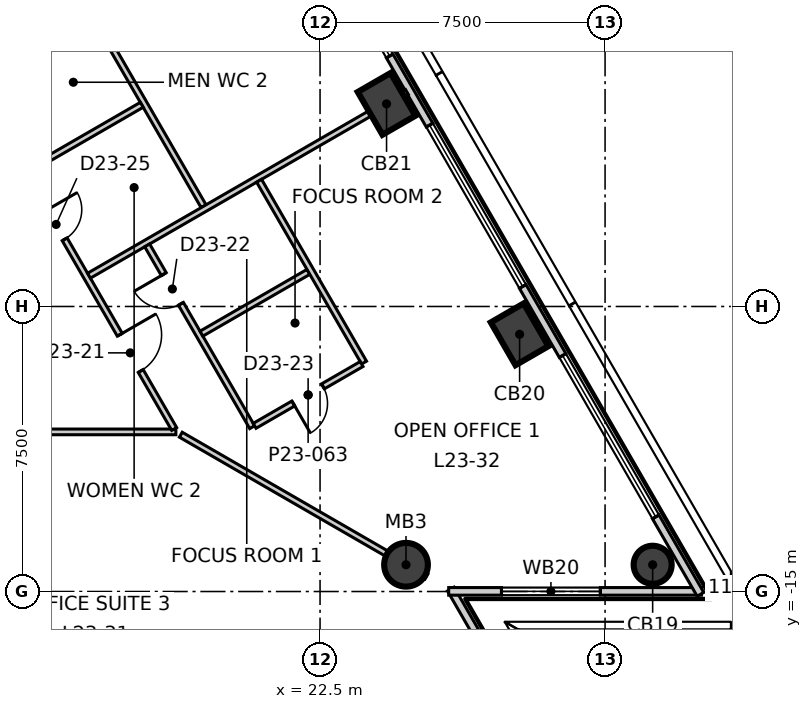
"""IFC4 building model, lengths in metres.
Left out: names, types, materials, properties, quantities, classifications, styles, units other than length and angle.
Written with IfcOpenShell. Run it as: python <this file> out.ifc"""

import sys

from ifc_helpers import new_model, si_unit, direction, frame, frame_2d, origin, origin_2d, place, context, subcontext, project, spatial, rectangle, circle, extrude, element, fill, save


model = new_model("IFC4")
c1 = context("Model", 3, precision=1e-05, world=origin(), true_north=direction((0.0, 1.0)))
c2 = subcontext(c1, "Body", "Model", "MODEL_VIEW")
j1 = project(units=[si_unit("LENGTHUNIT", "METRE"), si_unit("PLANEANGLEUNIT", "RADIAN")], contexts=[c1])
p1 = place(None, origin())
s1 = spatial("IfcSite", under=j1, at=p1, CompositionType="ELEMENT")
p2 = place(p1, origin())
s2 = spatial("IfcBuilding", under=s1, at=p2, CompositionType="ELEMENT")
p3 = place(p2, frame((0.0, 0.0, 104.3)))
s3 = spatial("IfcBuildingStorey", under=s2, at=p3, CompositionType="ELEMENT", Elevation=104.3)
p4 = place(p3, frame((31.252, -14.296, -0.3), z_axis=(0.0, 0.0, 1.0), x_axis=(-0.5, 0.866025403784, 0.0)))
e1 = element("IfcColumn", 1, at=p4, inside=s3, PredefinedType="COLUMN", context=c2, shape_type="SweptSolid", body=[
    extrude(circle(Radius=0.5, at=origin_2d()), origin(), (0.0, 0.0, 1.0), 4.0),
])
for number, where, z_axis, x_axis in (
    (2, (27.751, -8.232, -0.3), (0.0, 0.0, 1.0), (-0.5, 0.866, 0.0)),
    (3, (24.25, -2.169, -0.3), (0.0, 0.0, 1.0), (-0.5, 0.866, 0.0)),
):
    element("IfcColumn", number, at=place(p3, frame(where, z_axis=z_axis, x_axis=x_axis)), inside=s3, PredefinedType="COLUMN", context=c2, shape_type="SweptSolid", body=[
        extrude(rectangle(XDim=1.3, YDim=1.0, at=origin_2d()), origin(), (0.0, 0.0, 1.0), 4.0),
    ])
p5 = place(p3, frame((24.762, -14.296, -0.3), z_axis=(0.0, 0.0, 1.0), x_axis=(1.0, 0.0, 0.0)))
e4 = element("IfcColumn", 4, at=p5, inside=s3, PredefinedType="COLUMN", context=c2, shape_type="SweptSolid", body=[
    extrude(circle(Radius=0.575, at=origin_2d()), origin(), (0.0, 0.0, 1.0), 4.0),
])
p6 = place(p3, frame((29.265, -20.695, 0.0), z_axis=(0.0, 0.0, 1.0), x_axis=(-0.499933237632, 0.866063945624, 0.0)))
e5 = element("IfcWall", 5, at=p6, inside=s3, PredefinedType="ELEMENTEDWALL", context=c2, shape_type="SweptSolid", body=[
    extrude(rectangle(XDim=6.651, YDim=0.2, at=frame_2d((3.325, 0.0))), origin(), (0.0, 0.0, 1.0), 3.7),
])
p7 = place(p6, frame((1.99, 0.0, 0.9)))
e6 = element("IfcOpeningElement", 6, at=p7, cuts=e5, PredefinedType="OPENING", context=c2, shape_type="SweptSolid", body=[
    extrude(rectangle(XDim=2.6, YDim=2.5, at=frame_2d((1.3, 1.25))), frame((0.0, 0.11, 0.0), z_axis=(0.0, -1.0, 0.0), x_axis=(1.0, 0.0, 0.0)), (0.0, 0.0, 1.0), 0.22),
])
p8 = place(p3, frame((25.885, -14.996, 0.0), z_axis=(0.0, 0.0, 1.0), x_axis=(1.0, 0.0, 0.0)))
e7 = element("IfcWall", 7, at=p8, inside=s3, PredefinedType="ELEMENTEDWALL", context=c2, shape_type="SweptSolid", body=[
    extrude(rectangle(XDim=6.65, YDim=0.2, at=frame_2d((3.325, 0.0))), origin(), (0.0, 0.0, 1.0), 3.7),
])
p9 = place(p8, frame((1.39, 0.0, 0.9)))
e8 = element("IfcOpeningElement", 8, at=p9, cuts=e7, PredefinedType="OPENING", context=c2, shape_type="SweptSolid", body=[
    extrude(rectangle(XDim=2.6, YDim=2.5, at=frame_2d((1.3, 1.25))), frame((0.0, 0.11, 0.0), z_axis=(0.0, -1.0, 0.0), x_axis=(1.0, 0.0, 0.0)), (0.0, 0.0, 1.0), 0.22),
])
p10 = place(p3, frame((32.51, -15.074, 0.0), z_axis=(0.0, 0.0, 1.0), x_axis=(-0.500008323105, 0.866020598384, 0.0)))
e9 = element("IfcWall", 9, at=p10, inside=s3, PredefinedType="ELEMENTEDWALL", context=c2, shape_type="SweptSolid", body=[
    extrude(rectangle(XDim=58.599, YDim=0.2, at=frame_2d((29.3, 0.0))), origin(), (0.0, 0.0, 1.0), 3.7),
])
p11 = place(p10, frame((2.354, 0.0, 0.9)))
e10 = element("IfcOpeningElement", 10, at=p11, cuts=e9, PredefinedType="OPENING", context=c2, shape_type="SweptSolid", body=[
    extrude(rectangle(XDim=4.9, YDim=2.5, at=frame_2d((2.45, 1.25))), frame((0.0, 0.11, 0.0), z_axis=(0.0, -1.0, 0.0), x_axis=(1.0, 0.0, 0.0)), (0.0, 0.0, 1.0), 0.22),
])
p12 = place(p10, frame((9.355, 0.0, 0.9)))
e11 = element("IfcOpeningElement", 11, at=p12, cuts=e9, PredefinedType="OPENING", context=c2, shape_type="SweptSolid", body=[
    extrude(rectangle(XDim=4.9, YDim=2.5, at=frame_2d((2.45, 1.25))), frame((0.0, 0.11, 0.0), z_axis=(0.0, -1.0, 0.0), x_axis=(1.0, 0.0, 0.0)), (0.0, 0.0, 1.0), 0.22),
])
p13 = place(p10, frame((16.357, 0.0, 0.9)))
e12 = element("IfcOpeningElement", 12, at=p13, cuts=e9, PredefinedType="OPENING", context=c2, shape_type="SweptSolid", body=[
    extrude(rectangle(XDim=4.9, YDim=2.5, at=frame_2d((2.45, 1.25))), frame((0.0, 0.11, 0.0), z_axis=(0.0, -1.0, 0.0), x_axis=(1.0, 0.0, 0.0)), (0.0, 0.0, 1.0), 0.22),
])
p14 = place(p10, frame((23.359, 0.0, 0.9)))
e13 = element("IfcOpeningElement", 13, at=p14, cuts=e9, PredefinedType="OPENING", context=c2, shape_type="SweptSolid", body=[
    extrude(rectangle(XDim=4.9, YDim=2.5, at=frame_2d((2.45, 1.25))), frame((0.0, 0.11, 0.0), z_axis=(0.0, -1.0, 0.0), x_axis=(1.0, 0.0, 0.0)), (0.0, 0.0, 1.0), 0.22),
])
p15 = place(p10, frame((30.36, 0.0, 0.9)))
e14 = element("IfcOpeningElement", 14, at=p15, cuts=e9, PredefinedType="OPENING", context=c2, shape_type="SweptSolid", body=[
    extrude(rectangle(XDim=4.9, YDim=2.5, at=frame_2d((2.45, 1.25))), frame((0.0, 0.11, 0.0), z_axis=(0.0, -1.0, 0.0), x_axis=(1.0, 0.0, 0.0)), (0.0, 0.0, 1.0), 0.22),
])
p16 = place(p10, frame((37.362, 0.0, 0.9)))
e15 = element("IfcOpeningElement", 15, at=p16, cuts=e9, PredefinedType="OPENING", context=c2, shape_type="SweptSolid", body=[
    extrude(rectangle(XDim=4.9, YDim=2.5, at=frame_2d((2.45, 1.25))), frame((0.0, 0.11, 0.0), z_axis=(0.0, -1.0, 0.0), x_axis=(1.0, 0.0, 0.0)), (0.0, 0.0, 1.0), 0.22),
])
p17 = place(p10, frame((44.364, 0.0, 0.9)))
e16 = element("IfcOpeningElement", 16, at=p17, cuts=e9, PredefinedType="OPENING", context=c2, shape_type="SweptSolid", body=[
    extrude(rectangle(XDim=4.9, YDim=2.5, at=frame_2d((2.45, 1.25))), frame((0.0, 0.11, 0.0), z_axis=(0.0, -1.0, 0.0), x_axis=(1.0, 0.0, 0.0)), (0.0, 0.0, 1.0), 0.22),
])
p18 = place(p10, frame((51.365, 0.0, 0.9)))
e17 = element("IfcOpeningElement", 17, at=p18, cuts=e9, PredefinedType="OPENING", context=c2, shape_type="SweptSolid", body=[
    extrude(rectangle(XDim=4.9, YDim=2.5, at=frame_2d((2.45, 1.25))), frame((0.0, 0.11, 0.0), z_axis=(0.0, -1.0, 0.0), x_axis=(1.0, 0.0, 0.0)), (0.0, 0.0, 1.0), 0.22),
])
p19 = place(p3, frame((-6.101, -10.8, 0.0), z_axis=(0.0, 0.0, 1.0), x_axis=(1.0, 0.0, 0.0)))
e18 = element("IfcWall", 18, at=p19, inside=s3, PredefinedType="PARTITIONING", context=c2, shape_type="SweptSolid", body=[
    extrude(rectangle(XDim=24.807, YDim=0.15, at=frame_2d((12.404, 0.0))), origin(), (0.0, 0.0, 1.0), 3.7),
])
p20 = place(p19, frame((10.449, 0.0, 0.0)))
e19 = element("IfcOpeningElement", 19, at=p20, cuts=e18, PredefinedType="OPENING", context=c2, shape_type="SweptSolid", body=[
    extrude(rectangle(XDim=1.1, YDim=2.1, at=frame_2d((0.55, 1.05))), frame((0.0, 0.085, 0.0), z_axis=(0.0, -1.0, 0.0), x_axis=(1.0, 0.0, 0.0)), (0.0, 0.0, 1.0), 0.17),
])
p21 = place(p19, frame((4.349, 0.0, 0.0)))
e20 = element("IfcOpeningElement", 20, at=p21, cuts=e18, PredefinedType="OPENING", context=c2, shape_type="SweptSolid", body=[
    extrude(rectangle(XDim=0.9, YDim=2.1, at=frame_2d((0.45, 1.05))), frame((0.0, 0.085, 0.0), z_axis=(0.0, -1.0, 0.0), x_axis=(1.0, 0.0, 0.0)), (0.0, 0.0, 1.0), 0.17),
])
p22 = place(p19, frame((7.149, 0.0, 0.0)))
e21 = element("IfcOpeningElement", 21, at=p22, cuts=e18, PredefinedType="OPENING", context=c2, shape_type="SweptSolid", body=[
    extrude(rectangle(XDim=1.0, YDim=2.1, at=frame_2d((0.5, 1.05))), frame((0.0, 0.085, 0.0), z_axis=(0.0, -1.0, 0.0), x_axis=(1.0, 0.0, 0.0)), (0.0, 0.0, 1.0), 0.17),
])
p23 = place(p19, frame((18.453, 0.0, 0.0)))
e22 = element("IfcOpeningElement", 22, at=p23, cuts=e18, PredefinedType="OPENING", context=c2, shape_type="SweptSolid", body=[
    extrude(rectangle(XDim=1.1, YDim=2.1, at=frame_2d((0.55, 1.05))), frame((0.0, 0.085, 0.0), z_axis=(0.0, -1.0, 0.0), x_axis=(1.0, 0.0, 0.0)), (0.0, 0.0, 1.0), 0.17),
])
p24 = place(p3, frame((9.804, 4.62, 0.0), z_axis=(0.0, 0.0, 1.0), x_axis=(0.49996419592, -0.866046074293, 0.0)))
e23 = element("IfcWall", 23, at=p24, inside=s3, PredefinedType="PARTITIONING", context=c2, shape_type="SweptSolid", body=[
    extrude(rectangle(XDim=17.718, YDim=0.15, at=frame_2d((8.859, 0.0))), origin(), (0.0, 0.0, 1.0), 3.7),
])
p25 = place(p24, frame((14.854, 0.0, 0.0)))
e24 = element("IfcOpeningElement", 24, at=p25, cuts=e23, PredefinedType="OPENING", context=c2, shape_type="SweptSolid", body=[
    extrude(rectangle(XDim=1.1, YDim=2.1, at=frame_2d((0.55, 1.05))), frame((0.0, 0.085, 0.0), z_axis=(0.0, -1.0, 0.0), x_axis=(1.0, 0.0, 0.0)), (0.0, 0.0, 1.0), 0.17),
])
p26 = place(p24, frame((1.552, 0.0, 0.0)))
e25 = element("IfcOpeningElement", 25, at=p26, cuts=e23, PredefinedType="OPENING", context=c2, shape_type="SweptSolid", body=[
    extrude(rectangle(XDim=1.1, YDim=2.1, at=frame_2d((0.55, 1.05))), frame((0.0, 0.085, 0.0), z_axis=(0.0, -1.0, 0.0), x_axis=(1.0, 0.0, 0.0)), (0.0, 0.0, 1.0), 0.17),
])
p27 = place(p24, frame((11.052, 0.0, 0.0)))
e26 = element("IfcOpeningElement", 26, at=p27, cuts=e23, PredefinedType="OPENING", context=c2, shape_type="SweptSolid", body=[
    extrude(rectangle(XDim=0.9, YDim=2.1, at=frame_2d((0.45, 1.05))), frame((0.0, 0.085, 0.0), z_axis=(0.0, -1.0, 0.0), x_axis=(1.0, 0.0, 0.0)), (0.0, 0.0, 1.0), 0.17),
])
p28 = place(p24, frame((7.852, 0.0, 0.0)))
e27 = element("IfcOpeningElement", 27, at=p28, cuts=e23, PredefinedType="OPENING", context=c2, shape_type="SweptSolid", body=[
    extrude(rectangle(XDim=0.9, YDim=2.1, at=frame_2d((0.45, 1.05))), frame((0.0, 0.085, 0.0), z_axis=(0.0, -1.0, 0.0), x_axis=(1.0, 0.0, 0.0)), (0.0, 0.0, 1.0), 0.17),
])
p29 = place(p24, frame((5.052, 0.0, 0.0)))
e28 = element("IfcOpeningElement", 28, at=p29, cuts=e23, PredefinedType="OPENING", context=c2, shape_type="SweptSolid", body=[
    extrude(rectangle(XDim=1.0, YDim=2.1, at=frame_2d((0.5, 1.05))), frame((0.0, 0.085, 0.0), z_axis=(0.0, -1.0, 0.0), x_axis=(1.0, 0.0, 0.0)), (0.0, 0.0, 1.0), 0.17),
])
p30 = place(p3, frame((15.072, 2.694, 0.0), z_axis=(0.0, 0.0, 1.0), x_axis=(0.500042162787, -0.86600105972, 0.0)))
e29 = element("IfcWall", 29, at=p30, inside=s3, PredefinedType="PARTITIONING", context=c2, shape_type="SweptSolid", body=[
    extrude(rectangle(XDim=8.725, YDim=0.15, at=frame_2d((4.363, 0.0))), origin(), (0.0, 0.0, 1.0), 3.7),
])
for number, where, z_axis, x_axis in (
    (30, (13.22, -1.147, 0.0), (0.0, 0.0, 1.0), (0.866, 0.5, 0.0)),
    (31, (14.82, -3.919, 0.0), (0.0, 0.0, 1.0), (0.866, 0.5, 0.0)),
):
    element("IfcWall", number, at=place(p3, frame(where, z_axis=z_axis, x_axis=x_axis)), inside=s3, PredefinedType="PARTITIONING", context=c2, shape_type="SweptSolid", body=[
        extrude(rectangle(XDim=3.45, YDim=0.15, at=frame_2d((1.725, 0.0))), origin(), (0.0, 0.0, 1.0), 3.7),
    ])
p31 = place(p3, frame((16.42, -6.69, 0.0), z_axis=(0.0, 0.0, 1.0), x_axis=(0.866013897511, 0.50001992892, 0.0)))
e32 = element("IfcWall", 32, at=p31, inside=s3, PredefinedType="PARTITIONING", context=c2, shape_type="SweptSolid", body=[
    extrude(rectangle(XDim=9.662, YDim=0.15, at=frame_2d((4.831, 0.0))), origin(), (0.0, 0.0, 1.0), 3.7),
])
p32 = place(p3, frame((18.836, -10.874, 0.0), z_axis=(0.0, 0.0, 1.0), x_axis=(0.865999816151, -0.500044316462, 0.0)))
e33 = element("IfcWall", 33, at=p32, inside=s3, PredefinedType="PARTITIONING", context=c2, shape_type="SweptSolid", body=[
    extrude(rectangle(XDim=7.463, YDim=0.15, at=frame_2d((3.731, 0.0))), origin(), (0.0, 0.0, 1.0), 3.15),
])
p33 = place(p3, frame((17.951, -5.892, 0.0), z_axis=(0.0, 0.0, 1.0), x_axis=(0.500083244257, -0.865977337356, 0.0)))
e34 = element("IfcWall", 34, at=p33, inside=s3, PredefinedType="PARTITIONING", context=c2, shape_type="SweptSolid", body=[
    extrude(rectangle(XDim=5.525, YDim=0.15, at=frame_2d((2.763, 0.0))), origin(), (0.0, 0.0, 1.0), 3.7),
])
p34 = place(p33, frame((0.875, 0.0, 0.0)))
e35 = element("IfcOpeningElement", 35, at=p34, cuts=e34, PredefinedType="OPENING", context=c2, shape_type="SweptSolid", body=[
    extrude(rectangle(XDim=0.9, YDim=2.1, at=frame_2d((0.45, 1.05))), frame((0.0, 0.085, 0.0), z_axis=(0.0, -1.0, 0.0), x_axis=(1.0, 0.0, 0.0)), (0.0, 0.0, 1.0), 0.17),
])
p35 = place(p3, frame((19.379, -8.215, 0.0), z_axis=(0.0, 0.0, 1.0), x_axis=(0.86599666273, 0.500049777664, 0.0)))
e36 = element("IfcWall", 36, at=p35, inside=s3, PredefinedType="PARTITIONING", context=c2, shape_type="SweptSolid", body=[
    extrude(rectangle(XDim=3.25, YDim=0.15, at=frame_2d((1.625, 0.0))), origin(), (0.0, 0.0, 1.0), 3.7),
])
p36 = place(p3, frame((20.896, -4.192, 0.0), z_axis=(0.0, 0.0, 1.0), x_axis=(0.499898410332, -0.866084048662, 0.0)))
e37 = element("IfcWall", 37, at=p36, inside=s3, PredefinedType="PARTITIONING", context=c2, shape_type="SweptSolid", body=[
    extrude(rectangle(XDim=5.525, YDim=0.15, at=frame_2d((2.763, 0.0))), origin(), (0.0, 0.0, 1.0), 3.7),
])
p37 = place(p3, frame((20.779, -10.64, 0.0), z_axis=(0.0, 0.0, 1.0), x_axis=(0.865977875238, 0.500082312822, 0.0)))
e38 = element("IfcWall", 38, at=p37, inside=s3, PredefinedType="PARTITIONING", context=c2, shape_type="SweptSolid", body=[
    extrude(rectangle(XDim=3.25, YDim=0.15, at=frame_2d((1.625, 0.0))), origin(), (0.0, 0.0, 1.0), 3.7),
])
p38 = place(p37, frame((1.175, 0.0, 0.0)))
e39 = element("IfcOpeningElement", 39, at=p38, cuts=e38, PredefinedType="OPENING", context=c2, shape_type="SweptSolid", body=[
    extrude(rectangle(XDim=0.9, YDim=2.1, at=frame_2d((0.45, 1.05))), frame((0.0, 0.085, 0.0), z_axis=(0.0, -1.0, 0.0), x_axis=(1.0, 0.0, 0.0)), (0.0, 0.0, 1.0), 0.17),
])
p39 = place(p9, origin())
e40 = element("IfcWindow", 40, at=p39, inside=s3, PartitioningType="SINGLE_PANEL", PredefinedType="WINDOW", context=c2, shape_type="SweptSolid", body=[
    extrude(rectangle(XDim=2.6, YDim=2.5, at=frame_2d((1.3, 1.25))), frame((0.0, 0.03, 0.0), z_axis=(0.0, -1.0, 0.0), x_axis=(1.0, 0.0, 0.0)), (0.0, 0.0, 1.0), 0.06),
])
fill(e8, e40)
p40 = place(p11, origin())
e41 = element("IfcWindow", 41, at=p40, inside=s3, PartitioningType="SINGLE_PANEL", PredefinedType="WINDOW", context=c2, shape_type="SweptSolid", body=[
    extrude(rectangle(XDim=4.9, YDim=2.5, at=frame_2d((2.45, 1.25))), frame((0.0, 0.03, 0.0), z_axis=(0.0, -1.0, 0.0), x_axis=(1.0, 0.0, 0.0)), (0.0, 0.0, 1.0), 0.06),
])
fill(e10, e41)
p41 = place(p12, origin())
e42 = element("IfcWindow", 42, at=p41, inside=s3, PartitioningType="SINGLE_PANEL", PredefinedType="WINDOW", context=c2, shape_type="SweptSolid", body=[
    extrude(rectangle(XDim=4.9, YDim=2.5, at=frame_2d((2.45, 1.25))), frame((0.0, 0.03, 0.0), z_axis=(0.0, -1.0, 0.0), x_axis=(1.0, 0.0, 0.0)), (0.0, 0.0, 1.0), 0.06),
])
fill(e11, e42)
p42 = place(p13, origin())
e43 = element("IfcWindow", 43, at=p42, inside=s3, PartitioningType="SINGLE_PANEL", PredefinedType="WINDOW", context=c2, shape_type="SweptSolid", body=[
    extrude(rectangle(XDim=4.9, YDim=2.5, at=frame_2d((2.45, 1.25))), frame((0.0, 0.03, 0.0), z_axis=(0.0, -1.0, 0.0), x_axis=(1.0, 0.0, 0.0)), (0.0, 0.0, 1.0), 0.06),
])
fill(e12, e43)
p43 = place(p25, origin())
e44 = element("IfcDoor", 44, at=p43, inside=s3, OperationType="SINGLE_SWING_RIGHT", PredefinedType="DOOR", context=c2, shape_type="SweptSolid", body=[
    extrude(rectangle(XDim=1.1, YDim=2.1, at=frame_2d((0.55, 1.05))), frame((0.0, 0.025, 0.0), z_axis=(0.0, -1.0, 0.0), x_axis=(1.0, 0.0, 0.0)), (0.0, 0.0, 1.0), 0.05),
])
fill(e24, e44)
p44 = place(p34, origin())
e45 = element("IfcDoor", 45, at=p44, inside=s3, OperationType="SINGLE_SWING_LEFT", PredefinedType="DOOR", context=c2, shape_type="SweptSolid", body=[
    extrude(rectangle(XDim=0.9, YDim=2.1, at=frame_2d((0.45, 1.05))), frame((0.0, 0.025, 0.0), z_axis=(0.0, -1.0, 0.0), x_axis=(1.0, 0.0, 0.0)), (0.0, 0.0, 1.0), 0.05),
])
fill(e35, e45)
p45 = place(p38, origin())
e46 = element("IfcDoor", 46, at=p45, inside=s3, OperationType="SINGLE_SWING_LEFT", PredefinedType="DOOR", context=c2, shape_type="SweptSolid", body=[
    extrude(rectangle(XDim=0.9, YDim=2.1, at=frame_2d((0.45, 1.05))), frame((0.0, 0.025, 0.0), z_axis=(0.0, -1.0, 0.0), x_axis=(1.0, 0.0, 0.0)), (0.0, 0.0, 1.0), 0.05),
])
fill(e39, e46)
p46 = place(p27, origin())
e47 = element("IfcDoor", 47, at=p46, inside=s3, OperationType="SINGLE_SWING_RIGHT", PredefinedType="DOOR", context=c2, shape_type="SweptSolid", body=[
    extrude(rectangle(XDim=0.9, YDim=2.1, at=frame_2d((0.45, 1.05))), frame((0.0, 0.025, 0.0), z_axis=(0.0, -1.0, 0.0), x_axis=(1.0, 0.0, 0.0)), (0.0, 0.0, 1.0), 0.05),
])
fill(e26, e47)
save(model, sys.argv[1])
